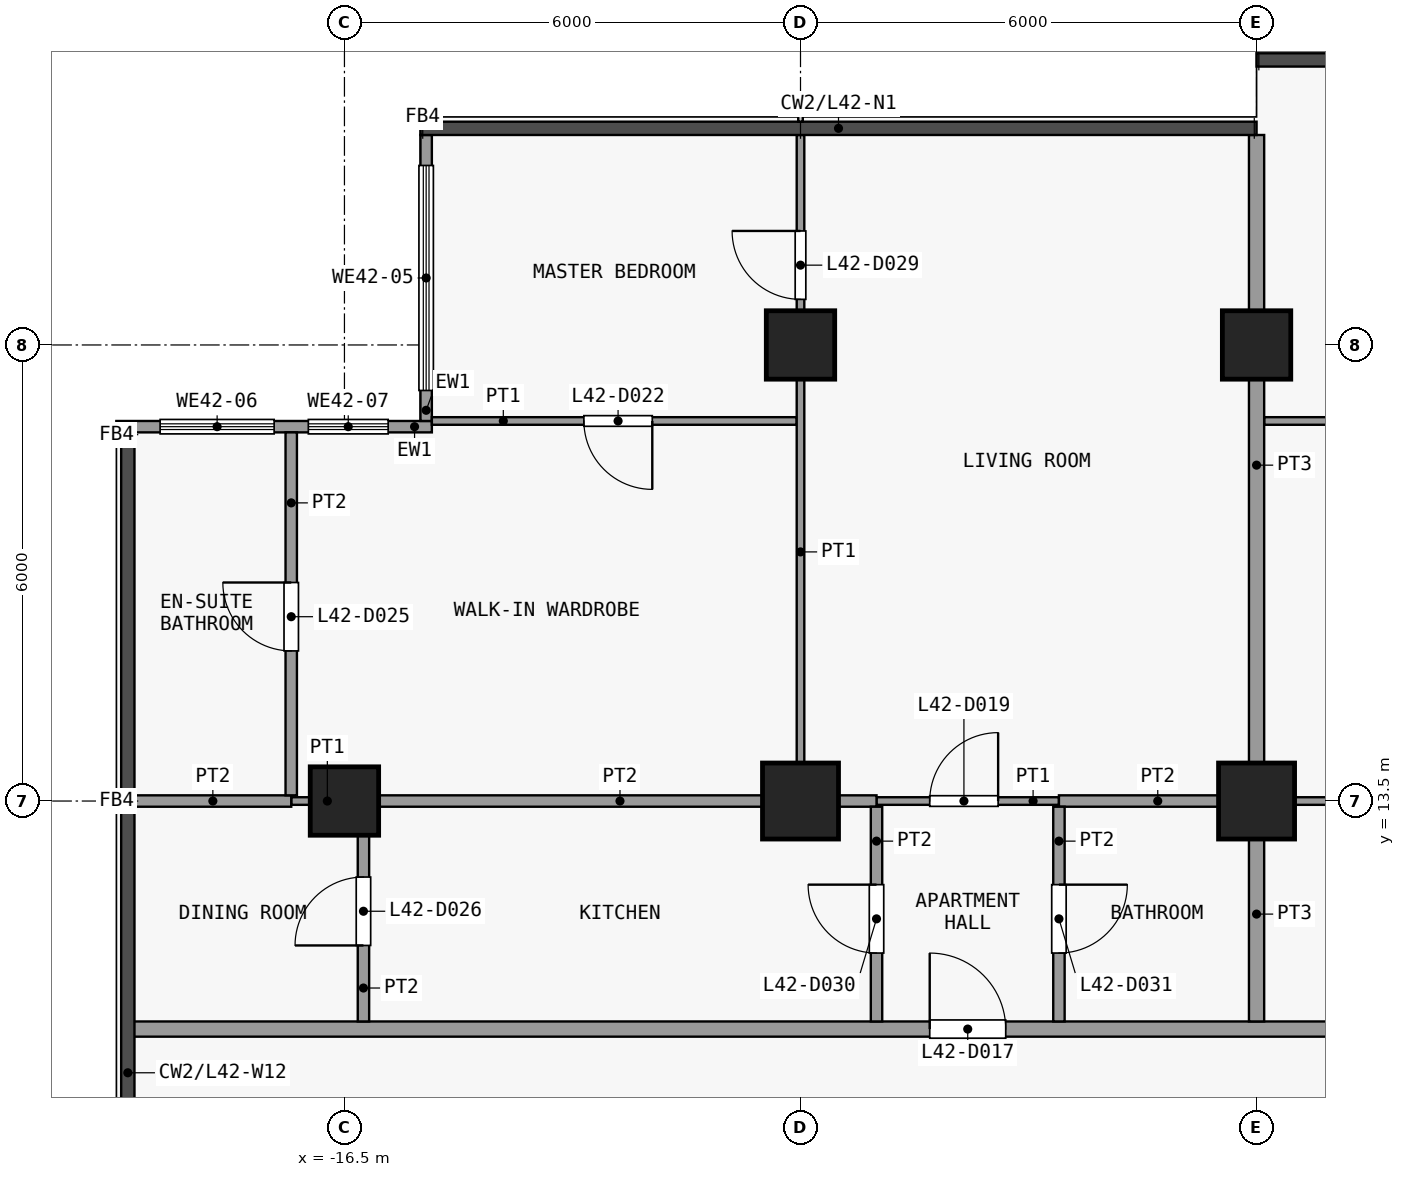
"""IFC4 building model, lengths in metres.
Left out: names, types, materials, properties, quantities, classifications, styles, units other than length and angle.
Written with IfcOpenShell. Run it as: python <this file> out.ifc"""

import sys

from ifc_helpers import new_model, si_unit, direction, frame, frame_2d, origin, origin_2d, place, context, subcontext, project, spatial, rectangle, extrude, element, fill, save


model = new_model("IFC4")
c1 = context("Model", 3, precision=1e-05, world=origin(), true_north=direction((0.0, 1.0)))
c2 = subcontext(c1, "Body", "Model", "MODEL_VIEW")
j1 = project(units=[si_unit("LENGTHUNIT", "METRE"), si_unit("PLANEANGLEUNIT", "RADIAN")], contexts=[c1])
p1 = place(None, origin())
s1 = spatial("IfcSite", under=j1, at=p1, CompositionType="ELEMENT")
p2 = place(p1, origin())
s2 = spatial("IfcBuilding", under=s1, at=p2, CompositionType="ELEMENT")
p3 = place(p2, frame((0.0, 0.0, 170.9)))
s3 = spatial("IfcBuildingStorey", under=s2, at=p3, CompositionType="ELEMENT", Elevation=170.9)
p4 = place(p3, frame((-16.5, 13.5, 0.0), z_axis=(0.0, 0.0, 1.0), x_axis=(1.0, 0.0, 0.0)))
e1 = element("IfcColumn", 1, at=p4, inside=s3, PredefinedType="COLUMN", context=c2, shape_type="SweptSolid", body=[
    extrude(rectangle(XDim=0.9, YDim=0.9, at=origin_2d()), origin(), (0.0, 0.0, 1.0), 3.6),
])
p5 = place(p3, frame((-10.5, 13.5, 0.0), z_axis=(0.0, 0.0, 1.0), x_axis=(1.0, 0.0, 0.0)))
e2 = element("IfcColumn", 2, at=p5, inside=s3, PredefinedType="COLUMN", context=c2, shape_type="SweptSolid", body=[
    extrude(rectangle(XDim=1.0, YDim=1.0, at=origin_2d()), origin(), (0.0, 0.0, 1.0), 3.6),
])
p6 = place(p3, frame((-10.5, 19.5, 0.0), z_axis=(0.0, 0.0, 1.0), x_axis=(1.0, 0.0, 0.0)))
e3 = element("IfcColumn", 3, at=p6, inside=s3, PredefinedType="COLUMN", context=c2, shape_type="SweptSolid", body=[
    extrude(rectangle(XDim=0.9, YDim=0.9, at=origin_2d()), origin(), (0.0, 0.0, 1.0), 3.6),
])
p7 = place(p3, frame((-4.5, 13.5, 0.0), z_axis=(0.0, 0.0, 1.0), x_axis=(1.0, 0.0, 0.0)))
e4 = element("IfcColumn", 4, at=p7, inside=s3, PredefinedType="COLUMN", context=c2, shape_type="SweptSolid", body=[
    extrude(rectangle(XDim=1.0, YDim=1.0, at=origin_2d()), origin(), (0.0, 0.0, 1.0), 3.6),
])
p8 = place(p3, frame((-4.5, 19.5, 0.0), z_axis=(0.0, 0.0, 1.0), x_axis=(1.0, 0.0, 0.0)))
e5 = element("IfcColumn", 5, at=p8, inside=s3, PredefinedType="COLUMN", context=c2, shape_type="SweptSolid", body=[
    extrude(rectangle(XDim=0.9, YDim=0.9, at=origin_2d()), origin(), (0.0, 0.0, 1.0), 3.6),
])
p9 = place(p3, frame((-15.425, 18.5, 0.0), z_axis=(0.0, 0.0, 1.0), x_axis=(0.0, 1.0, 0.0)))
e6 = element("IfcWall", 6, at=p9, inside=s3, PredefinedType="SOLIDWALL", context=c2, shape_type="SweptSolid", body=[
    extrude(rectangle(XDim=3.762, YDim=0.15, at=frame_2d((1.881, 0.0))), origin(), (0.0, 0.0, 1.0), 3.3),
])
p10 = place(p9, frame((0.401, 0.0, 0.9)))
e7 = element("IfcOpeningElement", 7, at=p10, cuts=e6, PredefinedType="OPENING", context=c2, shape_type="SweptSolid", body=[
    extrude(rectangle(XDim=2.96, YDim=2.4, at=frame_2d((1.48, 1.2))), frame((0.0, 0.085, 0.0), z_axis=(0.0, -1.0, 0.0), x_axis=(1.0, 0.0, 0.0)), (0.0, 0.0, 1.0), 0.17),
])
p11 = place(p3, frame((-19.5, 18.425, 0.0), z_axis=(0.0, 0.0, 1.0), x_axis=(1.0, 0.0, 0.0)))
e8 = element("IfcWall", 8, at=p11, inside=s3, PredefinedType="SOLIDWALL", context=c2, shape_type="SweptSolid", body=[
    extrude(rectangle(XDim=4.15, YDim=0.15, at=frame_2d((2.075, 0.0))), origin(), (0.0, 0.0, 1.0), 3.3),
])
p12 = place(p11, frame((0.575, 0.0, 0.9)))
e9 = element("IfcOpeningElement", 9, at=p12, cuts=e8, PredefinedType="OPENING", context=c2, shape_type="SweptSolid", body=[
    extrude(rectangle(XDim=1.5, YDim=2.4, at=frame_2d((0.75, 1.2))), frame((0.0, 0.085, 0.0), z_axis=(0.0, -1.0, 0.0), x_axis=(1.0, 0.0, 0.0)), (0.0, 0.0, 1.0), 0.17),
])
p13 = place(p11, frame((2.525, 0.0, 0.9)))
e10 = element("IfcOpeningElement", 10, at=p13, cuts=e8, PredefinedType="OPENING", context=c2, shape_type="SweptSolid", body=[
    extrude(rectangle(XDim=1.05, YDim=2.4, at=frame_2d((0.525, 1.2))), frame((0.0, 0.085, 0.0), z_axis=(0.0, -1.0, 0.0), x_axis=(1.0, 0.0, 0.0)), (0.0, 0.0, 1.0), 0.17),
])
p14 = place(p3, frame((-19.35, 10.5, 0.0), z_axis=(0.0, 0.0, 1.0), x_axis=(1.0, 0.0, 0.0)))
e11 = element("IfcWall", 11, at=p14, inside=s3, PredefinedType="PARTITIONING", context=c2, shape_type="SweptSolid", body=[
    extrude(rectangle(XDim=37.2, YDim=0.2, at=frame_2d((18.6, 0.0))), origin(), (0.0, 0.0, 1.0), 3.3),
])
p15 = place(p14, frame((10.55, 0.0, 0.0)))
e12 = element("IfcOpeningElement", 12, at=p15, cuts=e11, PredefinedType="OPENING", context=c2, shape_type="SweptSolid", body=[
    extrude(rectangle(XDim=1.0, YDim=2.1, at=frame_2d((0.5, 1.05))), frame((0.0, 0.11, 0.0), z_axis=(0.0, -1.0, 0.0), x_axis=(1.0, 0.0, 0.0)), (0.0, 0.0, 1.0), 0.22),
])
p16 = place(p14, frame((24.55, 0.0, 0.0)))
e13 = element("IfcOpeningElement", 13, at=p16, cuts=e11, PredefinedType="OPENING", context=c2, shape_type="SweptSolid", body=[
    extrude(rectangle(XDim=1.0, YDim=2.1, at=frame_2d((0.5, 1.05))), frame((0.0, 0.11, 0.0), z_axis=(0.0, -1.0, 0.0), x_axis=(1.0, 0.0, 0.0)), (0.0, 0.0, 1.0), 0.22),
])
p17 = place(p3, frame((-17.2, 13.5, 0.0), z_axis=(0.0, 0.0, 1.0), x_axis=(1.0, 0.0, 0.0)))
e14 = element("IfcWall", 14, at=p17, inside=s3, PredefinedType="PARTITIONING", context=c2, shape_type="SweptSolid", body=[
    extrude(rectangle(XDim=0.95, YDim=0.1, at=frame_2d((0.475, 0.0))), origin(), (0.0, 0.0, 1.0), 3.3),
])
p18 = place(p3, frame((-9.5, 13.5, 0.0), z_axis=(0.0, 0.0, 1.0), x_axis=(1.0, 0.0, 0.0)))
e15 = element("IfcWall", 15, at=p18, inside=s3, PredefinedType="PARTITIONING", context=c2, shape_type="SweptSolid", body=[
    extrude(rectangle(XDim=2.4, YDim=0.1, at=frame_2d((1.2, 0.0))), origin(), (0.0, 0.0, 1.0), 3.3),
])
p19 = place(p18, frame((0.7, 0.0, 0.0)))
e16 = element("IfcOpeningElement", 16, at=p19, cuts=e15, PredefinedType="OPENING", context=c2, shape_type="SweptSolid", body=[
    extrude(rectangle(XDim=0.9, YDim=2.1, at=frame_2d((0.45, 1.05))), frame((0.0, 0.06, 0.0), z_axis=(0.0, -1.0, 0.0), x_axis=(1.0, 0.0, 0.0)), (0.0, 0.0, 1.0), 0.12),
])
p20 = place(p3, frame((-4.5, 13.5, 0.0), z_axis=(0.0, 0.0, 1.0), x_axis=(1.0, 0.0, 0.0)))
e17 = element("IfcWall", 17, at=p20, inside=s3, PredefinedType="PARTITIONING", context=c2, shape_type="SweptSolid", body=[
    extrude(rectangle(XDim=3.5, YDim=0.1, at=frame_2d((1.75, 0.0))), origin(), (0.0, 0.0, 1.0), 3.3),
])
p21 = place(p3, frame((-19.262, 13.5, 0.0), z_axis=(0.0, 0.0, 1.0), x_axis=(1.0, 0.0, 0.0)))
e18 = element("IfcWall", 18, at=p21, inside=s3, PredefinedType="PARTITIONING", context=c2, shape_type="SweptSolid", body=[
    extrude(rectangle(XDim=2.062, YDim=0.15, at=frame_2d((1.031, 0.0))), origin(), (0.0, 0.0, 1.0), 3.3),
])
p22 = place(p3, frame((-16.25, 13.5, 0.0), z_axis=(0.0, 0.0, 1.0), x_axis=(1.0, 0.0, 0.0)))
e19 = element("IfcWall", 19, at=p22, inside=s3, PredefinedType="PARTITIONING", context=c2, shape_type="SweptSolid", body=[
    extrude(rectangle(XDim=6.75, YDim=0.15, at=frame_2d((3.375, 0.0))), origin(), (0.0, 0.0, 1.0), 3.3),
])
p23 = place(p3, frame((-7.1, 13.5, 0.0), z_axis=(0.0, 0.0, 1.0), x_axis=(1.0, 0.0, 0.0)))
e20 = element("IfcWall", 20, at=p23, inside=s3, PredefinedType="PARTITIONING", context=c2, shape_type="SweptSolid", body=[
    extrude(rectangle(XDim=2.6, YDim=0.15, at=frame_2d((1.3, 0.0))), origin(), (0.0, 0.0, 1.0), 3.3),
])
p24 = place(p3, frame((-15.35, 18.5, 0.0), z_axis=(0.0, 0.0, 1.0), x_axis=(1.0, 0.0, 0.0)))
e21 = element("IfcWall", 21, at=p24, inside=s3, PredefinedType="PARTITIONING", context=c2, shape_type="SweptSolid", body=[
    extrude(rectangle(XDim=4.8, YDim=0.1, at=frame_2d((2.4, 0.0))), origin(), (0.0, 0.0, 1.0), 3.3),
])
p25 = place(p24, frame((2.0, 0.0, 0.0)))
e22 = element("IfcOpeningElement", 22, at=p25, cuts=e21, PredefinedType="OPENING", context=c2, shape_type="SweptSolid", body=[
    extrude(rectangle(XDim=0.9, YDim=2.1, at=frame_2d((0.45, 1.05))), frame((0.0, 0.06, 0.0), z_axis=(0.0, -1.0, 0.0), x_axis=(1.0, 0.0, 0.0)), (0.0, 0.0, 1.0), 0.12),
])
p26 = place(p3, frame((-4.4, 18.5, 0.0), z_axis=(0.0, 0.0, 1.0), x_axis=(1.0, 0.0, 0.0)))
e23 = element("IfcWall", 23, at=p26, inside=s3, PredefinedType="PARTITIONING", context=c2, shape_type="SweptSolid", body=[
    extrude(rectangle(XDim=8.85, YDim=0.1, at=frame_2d((4.425, 0.0))), origin(), (0.0, 0.0, 1.0), 3.3),
])
p27 = place(p26, frame((4.0, 0.0, 0.0)))
e24 = element("IfcOpeningElement", 24, at=p27, cuts=e23, PredefinedType="OPENING", context=c2, shape_type="SweptSolid", body=[
    extrude(rectangle(XDim=0.9, YDim=2.1, at=frame_2d((0.45, 1.05))), frame((0.0, 0.06, 0.0), z_axis=(0.0, -1.0, 0.0), x_axis=(1.0, 0.0, 0.0)), (0.0, 0.0, 1.0), 0.12),
])
p28 = place(p3, frame((-17.2, 13.575, 0.0), z_axis=(0.0, 0.0, 1.0), x_axis=(0.0, 1.0, 0.0)))
e25 = element("IfcWall", 25, at=p28, inside=s3, PredefinedType="PARTITIONING", context=c2, shape_type="SweptSolid", body=[
    extrude(rectangle(XDim=4.775, YDim=0.15, at=frame_2d((2.388, 0.0))), origin(), (0.0, 0.0, 1.0), 3.3),
])
p29 = place(p28, frame((1.9, 0.0, 0.0)))
e26 = element("IfcOpeningElement", 26, at=p29, cuts=e25, PredefinedType="OPENING", context=c2, shape_type="SweptSolid", body=[
    extrude(rectangle(XDim=0.9, YDim=2.1, at=frame_2d((0.45, 1.05))), frame((0.0, 0.085, 0.0), z_axis=(0.0, -1.0, 0.0), x_axis=(1.0, 0.0, 0.0)), (0.0, 0.0, 1.0), 0.17),
])
p30 = place(p3, frame((-16.25, 10.6, 0.0), z_axis=(0.0, 0.0, 1.0), x_axis=(0.0, 1.0, 0.0)))
e27 = element("IfcWall", 27, at=p30, inside=s3, PredefinedType="PARTITIONING", context=c2, shape_type="SweptSolid", body=[
    extrude(rectangle(XDim=2.825, YDim=0.15, at=frame_2d((1.413, 0.0))), origin(), (0.0, 0.0, 1.0), 3.3),
])
p31 = place(p30, frame((1.0, 0.0, 0.0)))
e28 = element("IfcOpeningElement", 28, at=p31, cuts=e27, PredefinedType="OPENING", context=c2, shape_type="SweptSolid", body=[
    extrude(rectangle(XDim=0.9, YDim=2.1, at=frame_2d((0.45, 1.05))), frame((0.0, 0.085, 0.0), z_axis=(0.0, -1.0, 0.0), x_axis=(1.0, 0.0, 0.0)), (0.0, 0.0, 1.0), 0.17),
])
p32 = place(p3, frame((-10.5, 13.575, 0.0), z_axis=(0.0, 0.0, 1.0), x_axis=(0.0, 1.0, 0.0)))
e29 = element("IfcWall", 29, at=p32, inside=s3, PredefinedType="PARTITIONING", context=c2, shape_type="SweptSolid", body=[
    extrude(rectangle(XDim=8.688, YDim=0.1, at=frame_2d((4.344, 0.0))), origin(), (0.0, 0.0, 1.0), 3.3),
])
p33 = place(p32, frame((6.525, 0.0, 0.0)))
e30 = element("IfcOpeningElement", 30, at=p33, cuts=e29, PredefinedType="OPENING", context=c2, shape_type="SweptSolid", body=[
    extrude(rectangle(XDim=0.9, YDim=2.1, at=frame_2d((0.45, 1.05))), frame((0.0, 0.06, 0.0), z_axis=(0.0, -1.0, 0.0), x_axis=(1.0, 0.0, 0.0)), (0.0, 0.0, 1.0), 0.12),
])
p34 = place(p3, frame((-9.5, 10.6, 0.0), z_axis=(0.0, 0.0, 1.0), x_axis=(0.0, 1.0, 0.0)))
e31 = element("IfcWall", 31, at=p34, inside=s3, PredefinedType="PARTITIONING", context=c2, shape_type="SweptSolid", body=[
    extrude(rectangle(XDim=2.825, YDim=0.15, at=frame_2d((1.413, 0.0))), origin(), (0.0, 0.0, 1.0), 3.3),
])
p35 = place(p34, frame((0.9, 0.0, 0.0)))
e32 = element("IfcOpeningElement", 32, at=p35, cuts=e31, PredefinedType="OPENING", context=c2, shape_type="SweptSolid", body=[
    extrude(rectangle(XDim=0.9, YDim=2.1, at=frame_2d((0.45, 1.05))), frame((0.0, 0.085, 0.0), z_axis=(0.0, -1.0, 0.0), x_axis=(1.0, 0.0, 0.0)), (0.0, 0.0, 1.0), 0.17),
])
p36 = place(p3, frame((-7.1, 10.6, 0.0), z_axis=(0.0, 0.0, 1.0), x_axis=(0.0, 1.0, 0.0)))
e33 = element("IfcWall", 33, at=p36, inside=s3, PredefinedType="PARTITIONING", context=c2, shape_type="SweptSolid", body=[
    extrude(rectangle(XDim=2.825, YDim=0.15, at=frame_2d((1.413, 0.0))), origin(), (0.0, 0.0, 1.0), 3.3),
])
p37 = place(p36, frame((0.9, 0.0, 0.0)))
e34 = element("IfcOpeningElement", 34, at=p37, cuts=e33, PredefinedType="OPENING", context=c2, shape_type="SweptSolid", body=[
    extrude(rectangle(XDim=0.9, YDim=2.1, at=frame_2d((0.45, 1.05))), frame((0.0, 0.085, 0.0), z_axis=(0.0, -1.0, 0.0), x_axis=(1.0, 0.0, 0.0)), (0.0, 0.0, 1.0), 0.17),
])
p38 = place(p3, frame((-4.5, 10.6, 0.0), z_axis=(0.0, 0.0, 1.0), x_axis=(0.0, 1.0, 0.0)))
e35 = element("IfcWall", 35, at=p38, inside=s3, PredefinedType="PARTITIONING", context=c2, shape_type="SweptSolid", body=[
    extrude(rectangle(XDim=2.825, YDim=0.2, at=frame_2d((1.413, 0.0))), origin(), (0.0, 0.0, 1.0), 3.3),
])
p39 = place(p3, frame((-4.5, 13.575, 0.0), z_axis=(0.0, 0.0, 1.0), x_axis=(0.0, 1.0, 0.0)))
e36 = element("IfcWall", 36, at=p39, inside=s3, PredefinedType="PARTITIONING", context=c2, shape_type="SweptSolid", body=[
    extrude(rectangle(XDim=8.688, YDim=0.2, at=frame_2d((4.344, 0.0))), origin(), (0.0, 0.0, 1.0), 3.3),
])
p40 = place(p10, origin())
e37 = element("IfcWindow", 37, at=p40, inside=s3, PartitioningType="SINGLE_PANEL", PredefinedType="WINDOW", context=c2, shape_type="SweptSolid", body=[
    extrude(rectangle(XDim=2.96, YDim=2.4, at=frame_2d((1.48, 1.2))), frame((0.0, 0.03, 0.0), z_axis=(0.0, -1.0, 0.0), x_axis=(1.0, 0.0, 0.0)), (0.0, 0.0, 1.0), 0.06),
])
fill(e7, e37)
p41 = place(p12, origin())
e38 = element("IfcWindow", 38, at=p41, inside=s3, PartitioningType="SINGLE_PANEL", PredefinedType="WINDOW", context=c2, shape_type="SweptSolid", body=[
    extrude(rectangle(XDim=1.5, YDim=2.4, at=frame_2d((0.75, 1.2))), frame((0.0, 0.03, 0.0), z_axis=(0.0, -1.0, 0.0), x_axis=(1.0, 0.0, 0.0)), (0.0, 0.0, 1.0), 0.06),
])
fill(e9, e38)
p42 = place(p13, origin())
e39 = element("IfcWindow", 39, at=p42, inside=s3, PartitioningType="SINGLE_PANEL", PredefinedType="WINDOW", context=c2, shape_type="SweptSolid", body=[
    extrude(rectangle(XDim=1.05, YDim=2.4, at=frame_2d((0.525, 1.2))), frame((0.0, 0.03, 0.0), z_axis=(0.0, -1.0, 0.0), x_axis=(1.0, 0.0, 0.0)), (0.0, 0.0, 1.0), 0.06),
])
fill(e10, e39)
p43 = place(p15, origin())
e40 = element("IfcDoor", 40, at=p43, inside=s3, OperationType="SINGLE_SWING_RIGHT", PredefinedType="DOOR", context=c2, shape_type="SweptSolid", body=[
    extrude(rectangle(XDim=1.0, YDim=2.1, at=frame_2d((0.5, 1.05))), frame((0.0, 0.025, 0.0), z_axis=(0.0, -1.0, 0.0), x_axis=(1.0, 0.0, 0.0)), (0.0, 0.0, 1.0), 0.05),
])
fill(e12, e40)
p44 = place(p19, origin())
e41 = element("IfcDoor", 41, at=p44, inside=s3, OperationType="SINGLE_SWING_LEFT", PredefinedType="DOOR", context=c2, shape_type="SweptSolid", body=[
    extrude(rectangle(XDim=0.9, YDim=2.1, at=frame_2d((0.45, 1.05))), frame((0.0, 0.025, 0.0), z_axis=(0.0, -1.0, 0.0), x_axis=(1.0, 0.0, 0.0)), (0.0, 0.0, 1.0), 0.05),
])
fill(e16, e41)
p45 = place(p25, origin())
e42 = element("IfcDoor", 42, at=p45, inside=s3, OperationType="SINGLE_SWING_RIGHT", PredefinedType="DOOR", context=c2, shape_type="SweptSolid", body=[
    extrude(rectangle(XDim=0.9, YDim=2.1, at=frame_2d((0.45, 1.05))), frame((0.0, 0.025, 0.0), z_axis=(0.0, -1.0, 0.0), x_axis=(1.0, 0.0, 0.0)), (0.0, 0.0, 1.0), 0.05),
])
fill(e22, e42)
p46 = place(p29, origin())
e43 = element("IfcDoor", 43, at=p46, inside=s3, OperationType="SINGLE_SWING_LEFT", PredefinedType="DOOR", context=c2, shape_type="SweptSolid", body=[
    extrude(rectangle(XDim=0.9, YDim=2.1, at=frame_2d((0.45, 1.05))), frame((0.0, 0.025, 0.0), z_axis=(0.0, -1.0, 0.0), x_axis=(1.0, 0.0, 0.0)), (0.0, 0.0, 1.0), 0.05),
])
fill(e26, e43)
p47 = place(p31, origin())
e44 = element("IfcDoor", 44, at=p47, inside=s3, OperationType="SINGLE_SWING_RIGHT", PredefinedType="DOOR", context=c2, shape_type="SweptSolid", body=[
    extrude(rectangle(XDim=0.9, YDim=2.1, at=frame_2d((0.45, 1.05))), frame((0.0, 0.025, 0.0), z_axis=(0.0, -1.0, 0.0), x_axis=(1.0, 0.0, 0.0)), (0.0, 0.0, 1.0), 0.05),
])
fill(e28, e44)
p48 = place(p33, origin())
e45 = element("IfcDoor", 45, at=p48, inside=s3, OperationType="SINGLE_SWING_LEFT", PredefinedType="DOOR", context=c2, shape_type="SweptSolid", body=[
    extrude(rectangle(XDim=0.9, YDim=2.1, at=frame_2d((0.45, 1.05))), frame((0.0, 0.025, 0.0), z_axis=(0.0, -1.0, 0.0), x_axis=(1.0, 0.0, 0.0)), (0.0, 0.0, 1.0), 0.05),
])
fill(e30, e45)
p49 = place(p35, origin())
e46 = element("IfcDoor", 46, at=p49, inside=s3, OperationType="SINGLE_SWING_LEFT", PredefinedType="DOOR", context=c2, shape_type="SweptSolid", body=[
    extrude(rectangle(XDim=0.9, YDim=2.1, at=frame_2d((0.45, 1.05))), frame((0.0, 0.025, 0.0), z_axis=(0.0, -1.0, 0.0), x_axis=(1.0, 0.0, 0.0)), (0.0, 0.0, 1.0), 0.05),
])
fill(e32, e46)
p50 = place(p37, origin())
e47 = element("IfcDoor", 47, at=p50, inside=s3, OperationType="SINGLE_SWING_RIGHT", PredefinedType="DOOR", context=c2, shape_type="SweptSolid", body=[
    extrude(rectangle(XDim=0.9, YDim=2.1, at=frame_2d((0.45, 1.05))), frame((0.0, 0.025, 0.0), z_axis=(0.0, -1.0, 0.0), x_axis=(1.0, 0.0, 0.0)), (0.0, 0.0, 1.0), 0.05),
])
fill(e34, e47)
save(model, sys.argv[1])
